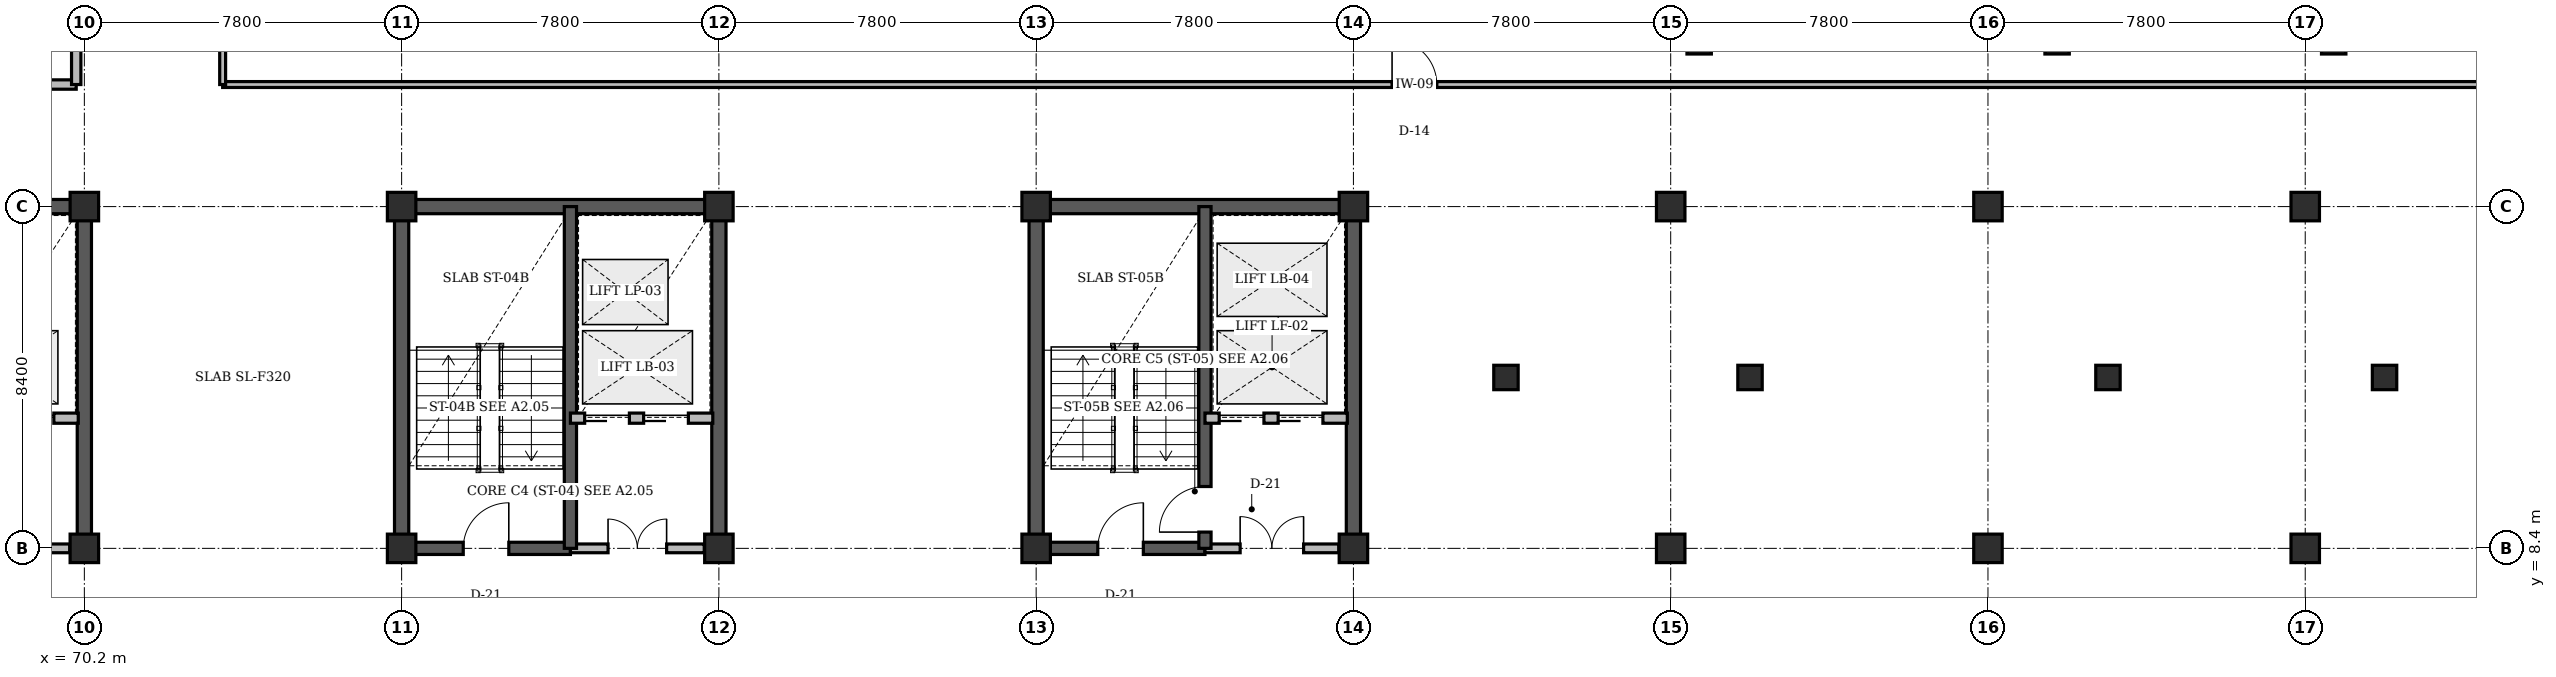
"""IFC4 building model, lengths in metres.
Left out: names, types, materials, properties, quantities, classifications, styles, units other than length and angle.
Written with IfcOpenShell. Run it as: python <this file> out.ifc"""

import sys

from ifc_helpers import new_model, si_unit, direction, frame, frame_2d, origin, origin_2d, place, context, subcontext, project, spatial, rectangle, circle, extrude, element, fill, save


model = new_model("IFC4")
c1 = context("Model", 3, precision=1e-05, world=origin(), true_north=direction((0.0, 1.0)))
c2 = subcontext(c1, "Body", "Model", "MODEL_VIEW")
j1 = project(units=[si_unit("LENGTHUNIT", "METRE"), si_unit("PLANEANGLEUNIT", "RADIAN")], contexts=[c1])
p1 = place(None, origin())
s1 = spatial("IfcSite", under=j1, at=p1, CompositionType="ELEMENT")
p2 = place(p1, origin())
s2 = spatial("IfcBuilding", under=s1, at=p2, CompositionType="ELEMENT")
p3 = place(p2, frame((0.0, 0.0, 14.4)))
s3 = spatial("IfcBuildingStorey", under=s2, at=p3, CompositionType="ELEMENT", Elevation=14.4)
p4 = place(p3, frame((62.225, 16.8, 0.0), z_axis=(0.0, 0.0, 1.0), x_axis=(1.0, 0.0, 0.0)))
e1 = element("IfcWall", 1, at=p4, inside=s3, PredefinedType="SHEAR", context=c2, shape_type="SweptSolid", body=[
    extrude(rectangle(XDim=8.15, YDim=0.35, at=frame_2d((4.075, 0.0))), origin(), (0.0, 0.0, 1.0), 3.28),
])
p5 = place(p3, frame((70.2, 8.4, 0.0), z_axis=(0.0, 0.0, 1.0), x_axis=(0.0, 1.0, 0.0)))
e2 = element("IfcWall", 2, at=p5, inside=s3, PredefinedType="SHEAR", context=c2, shape_type="SweptSolid", body=[
    extrude(rectangle(XDim=8.4, YDim=0.35, at=frame_2d((4.2, 0.0))), origin(), (0.0, 0.0, 1.0), 3.28),
])
p6 = place(p3, frame((77.825, 16.8, 0.0), z_axis=(0.0, 0.0, 1.0), x_axis=(1.0, 0.0, 0.0)))
e3 = element("IfcWall", 3, at=p6, inside=s3, PredefinedType="SHEAR", context=c2, shape_type="SweptSolid", body=[
    extrude(rectangle(XDim=8.15, YDim=0.35, at=frame_2d((4.075, 0.0))), origin(), (0.0, 0.0, 1.0), 3.28),
])
for number, where, z_axis, x_axis in (
    (4, (78.0, 8.4, 0.0), (0.0, 0.0, 1.0), (0.0, 1.0, 0.0)),
    (5, (85.8, 8.4, 0.0), (0.0, 0.0, 1.0), (0.0, 1.0, 0.0)),
):
    element("IfcWall", number, at=place(p3, frame(where, z_axis=z_axis, x_axis=x_axis)), inside=s3, PredefinedType="SHEAR", context=c2, shape_type="SweptSolid", body=[
        extrude(rectangle(XDim=8.4, YDim=0.35, at=frame_2d((4.2, 0.0))), origin(), (0.0, 0.0, 1.0), 3.28),
    ])
p7 = place(p3, frame((93.425, 16.8, 0.0), z_axis=(0.0, 0.0, 1.0), x_axis=(1.0, 0.0, 0.0)))
e6 = element("IfcWall", 6, at=p7, inside=s3, PredefinedType="SHEAR", context=c2, shape_type="SweptSolid", body=[
    extrude(rectangle(XDim=8.15, YDim=0.35, at=frame_2d((4.075, 0.0))), origin(), (0.0, 0.0, 1.0), 3.28),
])
for number, where, z_axis, x_axis in (
    (7, (93.6, 8.4, 0.0), (0.0, 0.0, 1.0), (0.0, 1.0, 0.0)),
    (8, (101.4, 8.4, 0.0), (0.0, 0.0, 1.0), (0.0, 1.0, 0.0)),
):
    element("IfcWall", number, at=place(p3, frame(where, z_axis=z_axis, x_axis=x_axis)), inside=s3, PredefinedType="SHEAR", context=c2, shape_type="SweptSolid", body=[
        extrude(rectangle(XDim=8.4, YDim=0.35, at=frame_2d((4.2, 0.0))), origin(), (0.0, 0.0, 1.0), 3.28),
    ])
for number, where, z_axis, x_axis in (
    (9, (70.2, 8.4, 0.0), (0.0, 0.0, 1.0), (1.0, 0.0, 0.0)),
    (10, (70.2, 16.8, 0.0), (0.0, 0.0, 1.0), (1.0, 0.0, 0.0)),
    (11, (78.0, 8.4, 0.0), (0.0, 0.0, 1.0), (1.0, 0.0, 0.0)),
    (12, (78.0, 16.8, 0.0), (0.0, 0.0, 1.0), (1.0, 0.0, 0.0)),
    (13, (85.8, 8.4, 0.0), (0.0, 0.0, 1.0), (1.0, 0.0, 0.0)),
    (14, (85.8, 16.8, 0.0), (0.0, 0.0, 1.0), (1.0, 0.0, 0.0)),
    (15, (93.6, 8.4, 0.0), (0.0, 0.0, 1.0), (1.0, 0.0, 0.0)),
    (16, (93.6, 16.8, 0.0), (0.0, 0.0, 1.0), (1.0, 0.0, 0.0)),
    (17, (101.4, 8.4, 0.0), (0.0, 0.0, 1.0), (1.0, 0.0, 0.0)),
    (18, (101.4, 16.8, 0.0), (0.0, 0.0, 1.0), (1.0, 0.0, 0.0)),
    (19, (109.2, 8.4, 0.0), (0.0, 0.0, 1.0), (1.0, 0.0, 0.0)),
    (20, (109.2, 16.8, 0.0), (0.0, 0.0, 1.0), (1.0, 0.0, 0.0)),
    (21, (117.0, 8.4, 0.0), (0.0, 0.0, 1.0), (1.0, 0.0, 0.0)),
    (22, (117.0, 16.8, 0.0), (0.0, 0.0, 1.0), (1.0, 0.0, 0.0)),
    (23, (124.8, 8.4, 0.0), (0.0, 0.0, 1.0), (1.0, 0.0, 0.0)),
    (24, (124.8, 16.8, 0.0), (0.0, 0.0, 1.0), (1.0, 0.0, 0.0)),
):
    element("IfcColumn", number, at=place(p3, frame(where, z_axis=z_axis, x_axis=x_axis)), inside=s3, PredefinedType="COLUMN", context=c2, shape_type="SweptSolid", body=[
        extrude(rectangle(XDim=0.7, YDim=0.7, at=origin_2d()), origin(), (0.0, 0.0, 1.0), 3.6),
    ])
for number, where, z_axis, x_axis in (
    (25, (126.75, 12.6, 0.0), (0.0, 0.0, 1.0), (1.0, 0.0, 0.0)),
    (26, (125.5, 20.85, 0.0), (0.0, 0.0, 1.0), (1.0, 0.0, 0.0)),
    (27, (119.95, 12.6, 0.0), (0.0, 0.0, 1.0), (1.0, 0.0, 0.0)),
    (28, (118.7, 20.85, 0.0), (0.0, 0.0, 1.0), (1.0, 0.0, 0.0)),
    (29, (111.15, 12.6, 0.0), (0.0, 0.0, 1.0), (1.0, 0.0, 0.0)),
    (30, (109.9, 20.85, 0.0), (0.0, 0.0, 1.0), (1.0, 0.0, 0.0)),
    (31, (105.15, 12.6, 0.0), (0.0, 0.0, 1.0), (1.0, 0.0, 0.0)),
):
    element("IfcColumn", number, at=place(p3, frame(where, z_axis=z_axis, x_axis=x_axis)), inside=s3, PredefinedType="PILASTER", context=c2, shape_type="SweptSolid", body=[
        extrude(circle(Radius=0.3, at=origin_2d()), origin(), (0.0, 0.0, 1.0), 3.6),
    ])
p8 = place(p3, frame((66.55, 8.4, 0.0), z_axis=(0.0, 0.0, 1.0), x_axis=(1.0, 0.0, 0.0)))
e32 = element("IfcWall", 32, at=p8, inside=s3, PredefinedType="STANDARD", context=c2, shape_type="SweptSolid", body=[
    extrude(rectangle(XDim=3.29, YDim=0.215, at=frame_2d((1.645, 0.0))), origin(), (0.0, 0.0, 1.0), 2.62),
])
p9 = place(p8, frame((0.925, 0.0, 0.0)))
e33 = element("IfcOpeningElement", 33, at=p9, cuts=e32, PredefinedType="OPENING", context=c2, shape_type="SweptSolid", body=[
    extrude(rectangle(XDim=1.44, YDim=2.2, at=frame_2d((0.72, 1.1))), frame((0.0, 0.118, 0.0), z_axis=(0.0, -1.0, 0.0), x_axis=(1.0, 0.0, 0.0)), (0.0, 0.0, 1.0), 0.235),
])
p10 = place(p3, frame((66.55, 11.6, 0.0), z_axis=(0.0, 0.0, 1.0), x_axis=(1.0, 0.0, 0.0)))
e34 = element("IfcWall", 34, at=p10, inside=s3, PredefinedType="STANDARD", context=c2, shape_type="SweptSolid", body=[
    extrude(rectangle(XDim=3.5, YDim=0.25, at=frame_2d((1.75, 0.0))), origin(), (0.0, 0.0, 1.0), 3.3),
])
p11 = place(p10, frame((0.35, 0.0, 0.0)))
e35 = element("IfcOpeningElement", 35, at=p11, cuts=e34, PredefinedType="OPENING", context=c2, shape_type="SweptSolid", body=[
    extrude(rectangle(XDim=1.1, YDim=2.2, at=frame_2d((0.55, 1.1))), frame((0.0, 0.135, 0.0), z_axis=(0.0, -1.0, 0.0), x_axis=(1.0, 0.0, 0.0)), (0.0, 0.0, 1.0), 0.27),
])
p12 = place(p10, frame((1.8, 0.0, 0.0)))
e36 = element("IfcOpeningElement", 36, at=p12, cuts=e34, PredefinedType="OPENING", context=c2, shape_type="SweptSolid", body=[
    extrude(rectangle(XDim=1.1, YDim=2.2, at=frame_2d((0.55, 1.1))), frame((0.0, 0.135, 0.0), z_axis=(0.0, -1.0, 0.0), x_axis=(1.0, 0.0, 0.0)), (0.0, 0.0, 1.0), 0.27),
])
p13 = place(p3, frame((78.0, 8.4, 0.0), z_axis=(0.0, 0.0, 1.0), x_axis=(1.0, 0.0, 0.0)))
e37 = element("IfcWall", 37, at=p13, inside=s3, PredefinedType="SHEAR", context=c2, shape_type="SweptSolid", body=[
    extrude(rectangle(XDim=4.15, YDim=0.3, at=frame_2d((2.075, 0.0))), origin(), (0.0, 0.0, 1.0), 3.6),
])
p14 = place(p13, frame((1.515, 0.0, 0.0)))
e38 = element("IfcOpeningElement", 38, at=p14, cuts=e37, PredefinedType="OPENING", context=c2, shape_type="SweptSolid", body=[
    extrude(rectangle(XDim=1.12, YDim=2.15, at=frame_2d((0.56, 1.075))), frame((0.0, 0.16, 0.0), z_axis=(0.0, -1.0, 0.0), x_axis=(1.0, 0.0, 0.0)), (0.0, 0.0, 1.0), 0.32),
])
p15 = place(p3, frame((82.15, 8.4, 0.0), z_axis=(0.0, 0.0, 1.0), x_axis=(1.0, 0.0, 0.0)))
e39 = element("IfcWall", 39, at=p15, inside=s3, PredefinedType="STANDARD", context=c2, shape_type="SweptSolid", body=[
    extrude(rectangle(XDim=3.29, YDim=0.215, at=frame_2d((1.645, 0.0))), origin(), (0.0, 0.0, 1.0), 2.62),
])
p16 = place(p15, frame((0.925, 0.0, 0.0)))
e40 = element("IfcOpeningElement", 40, at=p16, cuts=e39, PredefinedType="OPENING", context=c2, shape_type="SweptSolid", body=[
    extrude(rectangle(XDim=1.44, YDim=2.2, at=frame_2d((0.72, 1.1))), frame((0.0, 0.118, 0.0), z_axis=(0.0, -1.0, 0.0), x_axis=(1.0, 0.0, 0.0)), (0.0, 0.0, 1.0), 0.235),
])
p17 = place(p3, frame((82.15, 8.4, 0.0), z_axis=(0.0, 0.0, 1.0), x_axis=(0.0, 1.0, 0.0)))
e41 = element("IfcWall", 41, at=p17, inside=s3, PredefinedType="SHEAR", context=c2, shape_type="SweptSolid", body=[
    extrude(rectangle(XDim=8.4, YDim=0.3, at=frame_2d((4.2, 0.0))), origin(), (0.0, 0.0, 1.0), 3.6),
])
p18 = place(p3, frame((82.15, 11.6, 0.0), z_axis=(0.0, 0.0, 1.0), x_axis=(1.0, 0.0, 0.0)))
e42 = element("IfcWall", 42, at=p18, inside=s3, PredefinedType="STANDARD", context=c2, shape_type="SweptSolid", body=[
    extrude(rectangle(XDim=3.5, YDim=0.25, at=frame_2d((1.75, 0.0))), origin(), (0.0, 0.0, 1.0), 3.3),
])
p19 = place(p18, frame((0.35, 0.0, 0.0)))
e43 = element("IfcOpeningElement", 43, at=p19, cuts=e42, PredefinedType="OPENING", context=c2, shape_type="SweptSolid", body=[
    extrude(rectangle(XDim=1.1, YDim=2.2, at=frame_2d((0.55, 1.1))), frame((0.0, 0.135, 0.0), z_axis=(0.0, -1.0, 0.0), x_axis=(1.0, 0.0, 0.0)), (0.0, 0.0, 1.0), 0.27),
])
p20 = place(p18, frame((1.8, 0.0, 0.0)))
e44 = element("IfcOpeningElement", 44, at=p20, cuts=e42, PredefinedType="OPENING", context=c2, shape_type="SweptSolid", body=[
    extrude(rectangle(XDim=1.1, YDim=2.2, at=frame_2d((0.55, 1.1))), frame((0.0, 0.135, 0.0), z_axis=(0.0, -1.0, 0.0), x_axis=(1.0, 0.0, 0.0)), (0.0, 0.0, 1.0), 0.27),
])
p21 = place(p3, frame((93.6, 8.4, 0.0), z_axis=(0.0, 0.0, 1.0), x_axis=(1.0, 0.0, 0.0)))
e45 = element("IfcWall", 45, at=p21, inside=s3, PredefinedType="SHEAR", context=c2, shape_type="SweptSolid", body=[
    extrude(rectangle(XDim=4.15, YDim=0.3, at=frame_2d((2.075, 0.0))), origin(), (0.0, 0.0, 1.0), 3.6),
])
p22 = place(p21, frame((1.515, 0.0, 0.0)))
e46 = element("IfcOpeningElement", 46, at=p22, cuts=e45, PredefinedType="OPENING", context=c2, shape_type="SweptSolid", body=[
    extrude(rectangle(XDim=1.12, YDim=2.15, at=frame_2d((0.56, 1.075))), frame((0.0, 0.16, 0.0), z_axis=(0.0, -1.0, 0.0), x_axis=(1.0, 0.0, 0.0)), (0.0, 0.0, 1.0), 0.32),
])
p23 = place(p3, frame((97.75, 8.4, 0.0), z_axis=(0.0, 0.0, 1.0), x_axis=(1.0, 0.0, 0.0)))
e47 = element("IfcWall", 47, at=p23, inside=s3, PredefinedType="STANDARD", context=c2, shape_type="SweptSolid", body=[
    extrude(rectangle(XDim=3.29, YDim=0.215, at=frame_2d((1.645, 0.0))), origin(), (0.0, 0.0, 1.0), 2.62),
])
p24 = place(p23, frame((0.865, 0.0, 0.0)))
e48 = element("IfcOpeningElement", 48, at=p24, cuts=e47, PredefinedType="OPENING", context=c2, shape_type="SweptSolid", body=[
    extrude(rectangle(XDim=1.56, YDim=2.2, at=frame_2d((0.78, 1.1))), frame((0.0, 0.118, 0.0), z_axis=(0.0, -1.0, 0.0), x_axis=(1.0, 0.0, 0.0)), (0.0, 0.0, 1.0), 0.235),
])
p25 = place(p3, frame((97.75, 8.4, 0.0), z_axis=(0.0, 0.0, 1.0), x_axis=(0.0, 1.0, 0.0)))
e49 = element("IfcWall", 49, at=p25, inside=s3, PredefinedType="SHEAR", context=c2, shape_type="SweptSolid", body=[
    extrude(rectangle(XDim=8.4, YDim=0.3, at=frame_2d((4.2, 0.0))), origin(), (0.0, 0.0, 1.0), 3.6),
])
p26 = place(p25, frame((0.4, 0.0, 0.0)))
e50 = element("IfcOpeningElement", 50, at=p26, cuts=e49, PredefinedType="OPENING", context=c2, shape_type="SweptSolid", body=[
    extrude(rectangle(XDim=1.12, YDim=2.15, at=frame_2d((0.56, 1.075))), frame((0.0, 0.16, 0.0), z_axis=(0.0, -1.0, 0.0), x_axis=(1.0, 0.0, 0.0)), (0.0, 0.0, 1.0), 0.32),
])
p27 = place(p3, frame((97.75, 11.6, 0.0), z_axis=(0.0, 0.0, 1.0), x_axis=(1.0, 0.0, 0.0)))
e51 = element("IfcWall", 51, at=p27, inside=s3, PredefinedType="STANDARD", context=c2, shape_type="SweptSolid", body=[
    extrude(rectangle(XDim=3.5, YDim=0.25, at=frame_2d((1.75, 0.0))), origin(), (0.0, 0.0, 1.0), 3.3),
])
p28 = place(p27, frame((0.35, 0.0, 0.0)))
e52 = element("IfcOpeningElement", 52, at=p28, cuts=e51, PredefinedType="OPENING", context=c2, shape_type="SweptSolid", body=[
    extrude(rectangle(XDim=1.1, YDim=2.2, at=frame_2d((0.55, 1.1))), frame((0.0, 0.135, 0.0), z_axis=(0.0, -1.0, 0.0), x_axis=(1.0, 0.0, 0.0)), (0.0, 0.0, 1.0), 0.27),
])
p29 = place(p27, frame((1.8, 0.0, 0.0)))
e53 = element("IfcOpeningElement", 53, at=p29, cuts=e51, PredefinedType="OPENING", context=c2, shape_type="SweptSolid", body=[
    extrude(rectangle(XDim=1.1, YDim=2.2, at=frame_2d((0.55, 1.1))), frame((0.0, 0.135, 0.0), z_axis=(0.0, -1.0, 0.0), x_axis=(1.0, 0.0, 0.0)), (0.0, 0.0, 1.0), 0.27),
])
p30 = place(p3, frame((16.0, 19.8, 0.0), z_axis=(0.0, 0.0, 1.0), x_axis=(1.0, 0.0, 0.0)))
e54 = element("IfcWall", 54, at=p30, inside=s3, PredefinedType="STANDARD", context=c2, shape_type="SweptSolid", body=[
    extrude(rectangle(XDim=54.0, YDim=0.23, at=frame_2d((27.0, 0.0))), origin(), (0.0, 0.0, 1.0), 3.3),
])
p31 = place(p30, frame((26.175, 0.0, 0.0)))
e55 = element("IfcOpeningElement", 55, at=p31, cuts=e54, PredefinedType="OPENING", context=c2, shape_type="SweptSolid", body=[
    extrude(rectangle(XDim=1.65, YDim=2.25, at=frame_2d((0.825, 1.125))), frame((0.0, 0.125, 0.0), z_axis=(0.0, -1.0, 0.0), x_axis=(1.0, 0.0, 0.0)), (0.0, 0.0, 1.0), 0.25),
])
p32 = place(p3, frame((70.0, 19.8, 0.0), z_axis=(0.0, 0.0, 1.0), x_axis=(0.0, 1.0, 0.0)))
e56 = element("IfcWall", 56, at=p32, inside=s3, PredefinedType="STANDARD", context=c2, shape_type="SweptSolid", body=[
    extrude(rectangle(XDim=5.0, YDim=0.23, at=frame_2d((2.5, 0.0))), origin(), (0.0, 0.0, 1.0), 2.605),
])
p33 = place(p3, frame((73.6, 19.8, 0.0), z_axis=(0.0, 0.0, 1.0), x_axis=(1.0, 0.0, 0.0)))
e57 = element("IfcWall", 57, at=p33, inside=s3, PredefinedType="PARTITIONING", context=c2, shape_type="SweptSolid", body=[
    extrude(rectangle(XDim=58.6, YDim=0.145, at=frame_2d((29.3, 0.0))), origin(), (0.0, 0.0, 1.0), 3.3),
])
p34 = place(p33, frame((28.75, 0.0, 0.0)))
e58 = element("IfcOpeningElement", 58, at=p34, cuts=e57, PredefinedType="OPENING", context=c2, shape_type="SweptSolid", body=[
    extrude(rectangle(XDim=1.1, YDim=2.15, at=frame_2d((0.55, 1.075))), frame((0.0, 0.083, 0.0), z_axis=(0.0, -1.0, 0.0), x_axis=(1.0, 0.0, 0.0)), (0.0, 0.0, 1.0), 0.165),
])
p35 = place(p3, frame((73.6, 19.8, 0.0), z_axis=(0.0, 0.0, 1.0), x_axis=(0.0, 1.0, 0.0)))
e59 = element("IfcWall", 59, at=p35, inside=s3, PredefinedType="PARTITIONING", context=c2, shape_type="SweptSolid", body=[
    extrude(rectangle(XDim=5.0, YDim=0.145, at=frame_2d((2.5, 0.0))), origin(), (0.0, 0.0, 1.0), 3.3),
])
p36 = place(p12, origin())
e60 = element("IfcDoor", 60, at=p36, inside=s3, OperationType="SLIDING_TO_LEFT", PredefinedType="DOOR", context=c2, shape_type="SweptSolid", body=[
    extrude(rectangle(XDim=1.1, YDim=2.2, at=frame_2d((0.55, 1.1))), frame((0.0, 0.025, 0.0), z_axis=(0.0, -1.0, 0.0), x_axis=(1.0, 0.0, 0.0)), (0.0, 0.0, 1.0), 0.05),
])
fill(e36, e60)
p37 = place(p14, origin())
e61 = element("IfcDoor", 61, at=p37, inside=s3, OperationType="SINGLE_SWING_RIGHT", PredefinedType="DOOR", context=c2, shape_type="SweptSolid", body=[
    extrude(rectangle(XDim=1.12, YDim=2.15, at=frame_2d((0.56, 1.075))), frame((0.0, 0.025, 0.0), z_axis=(0.0, -1.0, 0.0), x_axis=(1.0, 0.0, 0.0)), (0.0, 0.0, 1.0), 0.05),
])
fill(e38, e61)
p38 = place(p16, origin())
e62 = element("IfcDoor", 62, at=p38, inside=s3, OperationType="DOUBLE_DOOR_SINGLE_SWING", PredefinedType="DOOR", context=c2, shape_type="SweptSolid", body=[
    extrude(rectangle(XDim=1.44, YDim=2.2, at=frame_2d((0.72, 1.1))), frame((0.0, 0.025, 0.0), z_axis=(0.0, -1.0, 0.0), x_axis=(1.0, 0.0, 0.0)), (0.0, 0.0, 1.0), 0.05),
])
fill(e40, e62)
p39 = place(p19, origin())
e63 = element("IfcDoor", 63, at=p39, inside=s3, OperationType="SLIDING_TO_LEFT", PredefinedType="DOOR", context=c2, shape_type="SweptSolid", body=[
    extrude(rectangle(XDim=1.1, YDim=2.2, at=frame_2d((0.55, 1.1))), frame((0.0, 0.025, 0.0), z_axis=(0.0, -1.0, 0.0), x_axis=(1.0, 0.0, 0.0)), (0.0, 0.0, 1.0), 0.05),
])
fill(e43, e63)
p40 = place(p20, origin())
e64 = element("IfcDoor", 64, at=p40, inside=s3, OperationType="SLIDING_TO_LEFT", PredefinedType="DOOR", context=c2, shape_type="SweptSolid", body=[
    extrude(rectangle(XDim=1.1, YDim=2.2, at=frame_2d((0.55, 1.1))), frame((0.0, 0.025, 0.0), z_axis=(0.0, -1.0, 0.0), x_axis=(1.0, 0.0, 0.0)), (0.0, 0.0, 1.0), 0.05),
])
fill(e44, e64)
p41 = place(p22, origin())
e65 = element("IfcDoor", 65, at=p41, inside=s3, OperationType="SINGLE_SWING_RIGHT", PredefinedType="DOOR", context=c2, shape_type="SweptSolid", body=[
    extrude(rectangle(XDim=1.12, YDim=2.15, at=frame_2d((0.56, 1.075))), frame((0.0, 0.025, 0.0), z_axis=(0.0, -1.0, 0.0), x_axis=(1.0, 0.0, 0.0)), (0.0, 0.0, 1.0), 0.05),
])
fill(e46, e65)
p42 = place(p24, origin())
e66 = element("IfcDoor", 66, at=p42, inside=s3, OperationType="DOUBLE_DOOR_SINGLE_SWING", PredefinedType="DOOR", context=c2, shape_type="SweptSolid", body=[
    extrude(rectangle(XDim=1.56, YDim=2.2, at=frame_2d((0.78, 1.1))), frame((0.0, 0.025, 0.0), z_axis=(0.0, -1.0, 0.0), x_axis=(1.0, 0.0, 0.0)), (0.0, 0.0, 1.0), 0.05),
])
fill(e48, e66)
p43 = place(p26, origin())
e67 = element("IfcDoor", 67, at=p43, inside=s3, OperationType="SINGLE_SWING_LEFT", PredefinedType="DOOR", context=c2, shape_type="SweptSolid", body=[
    extrude(rectangle(XDim=1.12, YDim=2.15, at=frame_2d((0.56, 1.075))), frame((0.0, 0.025, 0.0), z_axis=(0.0, -1.0, 0.0), x_axis=(1.0, 0.0, 0.0)), (0.0, 0.0, 1.0), 0.05),
])
fill(e50, e67)
p44 = place(p28, origin())
e68 = element("IfcDoor", 68, at=p44, inside=s3, OperationType="SLIDING_TO_LEFT", PredefinedType="DOOR", context=c2, shape_type="SweptSolid", body=[
    extrude(rectangle(XDim=1.1, YDim=2.2, at=frame_2d((0.55, 1.1))), frame((0.0, 0.025, 0.0), z_axis=(0.0, -1.0, 0.0), x_axis=(1.0, 0.0, 0.0)), (0.0, 0.0, 1.0), 0.05),
])
fill(e52, e68)
p45 = place(p29, origin())
e69 = element("IfcDoor", 69, at=p45, inside=s3, OperationType="SLIDING_TO_LEFT", PredefinedType="DOOR", context=c2, shape_type="SweptSolid", body=[
    extrude(rectangle(XDim=1.1, YDim=2.2, at=frame_2d((0.55, 1.1))), frame((0.0, 0.025, 0.0), z_axis=(0.0, -1.0, 0.0), x_axis=(1.0, 0.0, 0.0)), (0.0, 0.0, 1.0), 0.05),
])
fill(e53, e69)
p46 = place(p34, origin())
e70 = element("IfcDoor", 70, at=p46, inside=s3, OperationType="SINGLE_SWING_LEFT", PredefinedType="DOOR", context=c2, shape_type="SweptSolid", body=[
    extrude(rectangle(XDim=1.1, YDim=2.15, at=frame_2d((0.55, 1.075))), frame((0.0, 0.025, 0.0), z_axis=(0.0, -1.0, 0.0), x_axis=(1.0, 0.0, 0.0)), (0.0, 0.0, 1.0), 0.05),
])
fill(e58, e70)
save(model, sys.argv[1])
